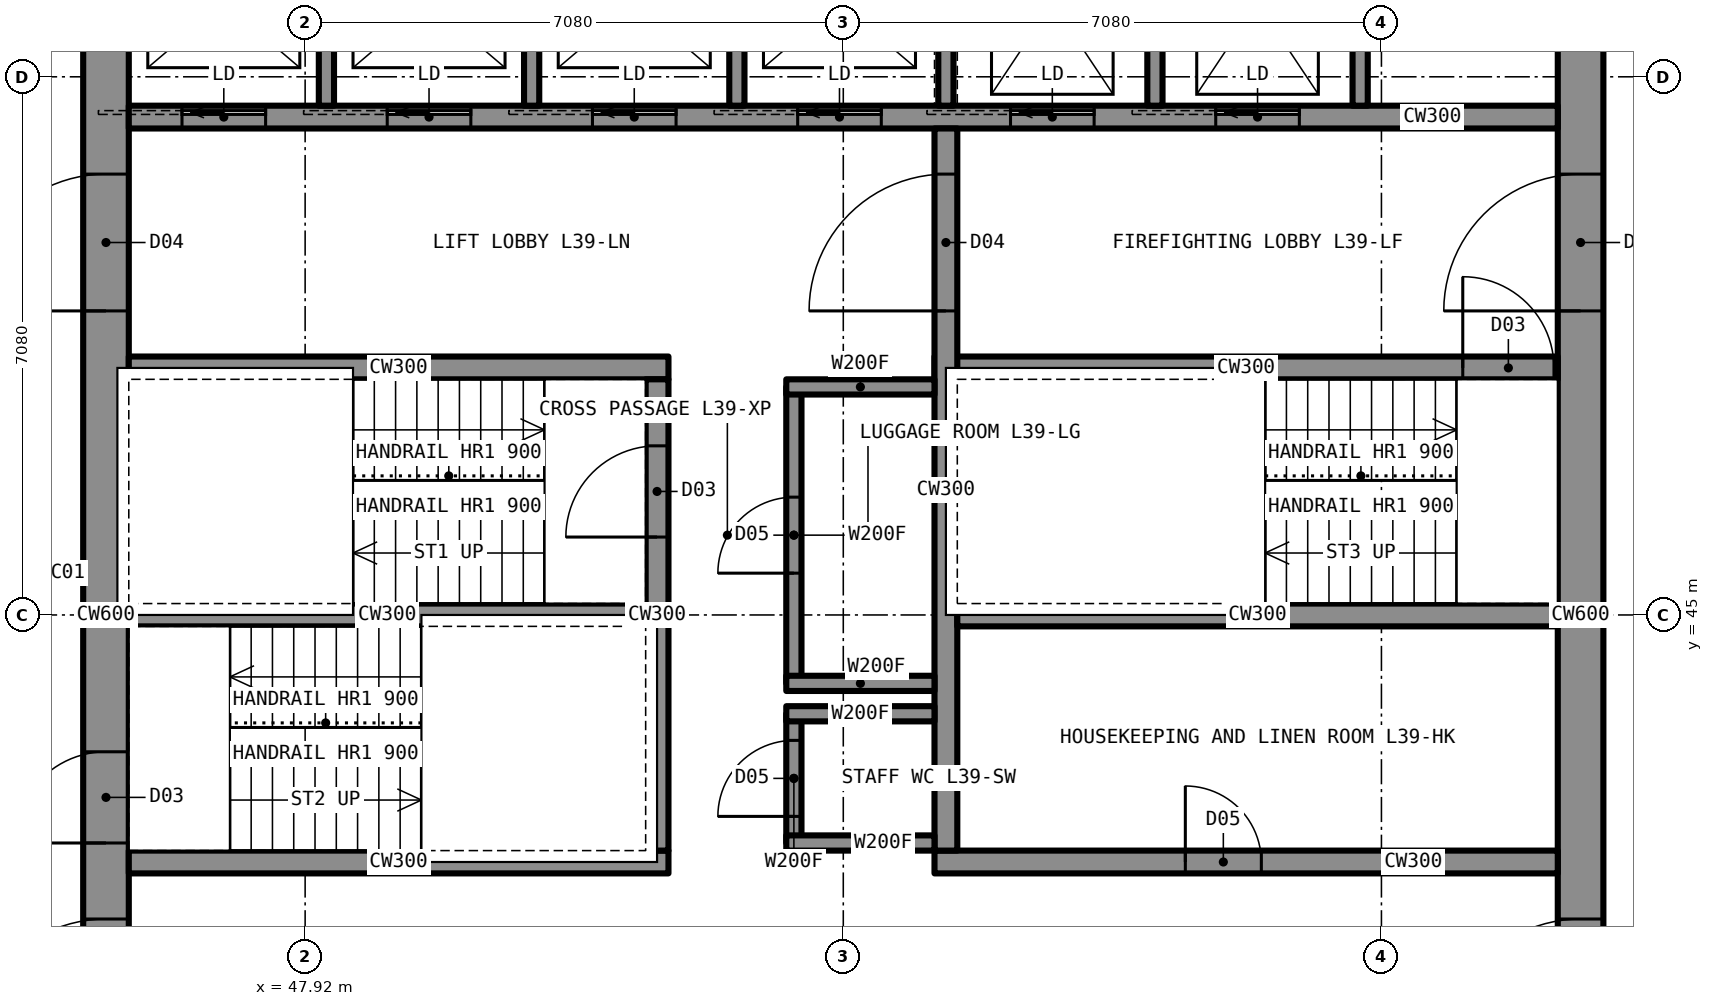
"""IFC4 building model, lengths in metres.
Left out: names, types, materials, properties, quantities, classifications, styles, units other than length and angle.
Written with IfcOpenShell. Run it as: python <this file> out.ifc"""

import sys

from ifc_helpers import new_model, si_unit, direction, frame, frame_2d, origin, place, context, subcontext, project, spatial, rectangle, extrude, element, fill, save


model = new_model("IFC4")
c1 = context("Model", 3, precision=1e-05, world=origin(), true_north=direction((0.0, 1.0)))
c2 = subcontext(c1, "Body", "Model", "MODEL_VIEW")
j1 = project(units=[si_unit("LENGTHUNIT", "METRE"), si_unit("PLANEANGLEUNIT", "RADIAN")], contexts=[c1])
p1 = place(None, origin())
s1 = spatial("IfcSite", under=j1, at=p1, CompositionType="ELEMENT")
p2 = place(p1, origin())
s2 = spatial("IfcBuilding", under=s1, at=p2, CompositionType="ELEMENT")
p3 = place(p2, frame((0.0, 0.0, 145.9)))
s3 = spatial("IfcBuildingStorey", under=s2, at=p3, CompositionType="ELEMENT", Elevation=145.9)
p4 = place(p3, frame((64.7, 35.6, 0.0), z_axis=(0.0, 0.0, 1.0), x_axis=(0.0, 1.0, 0.0)))
e1 = element("IfcWall", 1, at=p4, inside=s3, PredefinedType="SHEAR", context=c2, shape_type="SweptSolid", body=[
    extrude(rectangle(XDim=18.8, YDim=0.6, at=frame_2d((9.4, 0.0))), origin(), (0.0, 0.0, 1.0), 3.5),
])
p5 = place(p4, frame((13.4, 0.0, 0.0)))
e2 = element("IfcOpeningElement", 2, at=p5, cuts=e1, PredefinedType="OPENING", context=c2, shape_type="SweptSolid", body=[
    extrude(rectangle(XDim=1.8, YDim=2.2, at=frame_2d((0.9, 1.1))), frame((0.0, 0.31, 0.0), z_axis=(0.0, -1.0, 0.0), x_axis=(1.0, 0.0, 0.0)), (0.0, 0.0, 1.0), 0.62),
])
p6 = place(p4, frame((3.6, 0.0, 0.0)))
e3 = element("IfcOpeningElement", 3, at=p6, cuts=e1, PredefinedType="OPENING", context=c2, shape_type="SweptSolid", body=[
    extrude(rectangle(XDim=1.8, YDim=2.2, at=frame_2d((0.9, 1.1))), frame((0.0, 0.31, 0.0), z_axis=(0.0, -1.0, 0.0), x_axis=(1.0, 0.0, 0.0)), (0.0, 0.0, 1.0), 0.62),
])
p7 = place(p3, frame((45.3, 35.6, 0.0), z_axis=(0.0, 0.0, 1.0), x_axis=(0.0, 1.0, 0.0)))
e4 = element("IfcWall", 4, at=p7, inside=s3, PredefinedType="SHEAR", context=c2, shape_type="SweptSolid", body=[
    extrude(rectangle(XDim=18.8, YDim=0.6, at=frame_2d((9.4, 0.0))), origin(), (0.0, 0.0, 1.0), 3.5),
])
p8 = place(p7, frame((13.4, 0.0, 0.0)))
e5 = element("IfcOpeningElement", 5, at=p8, cuts=e4, PredefinedType="OPENING", context=c2, shape_type="SweptSolid", body=[
    extrude(rectangle(XDim=1.8, YDim=2.2, at=frame_2d((0.9, 1.1))), frame((0.0, 0.31, 0.0), z_axis=(0.0, -1.0, 0.0), x_axis=(1.0, 0.0, 0.0)), (0.0, 0.0, 1.0), 0.62),
])
p9 = place(p7, frame((3.6, 0.0, 0.0)))
e6 = element("IfcOpeningElement", 6, at=p9, cuts=e4, PredefinedType="OPENING", context=c2, shape_type="SweptSolid", body=[
    extrude(rectangle(XDim=1.8, YDim=2.2, at=frame_2d((0.9, 1.1))), frame((0.0, 0.31, 0.0), z_axis=(0.0, -1.0, 0.0), x_axis=(1.0, 0.0, 0.0)), (0.0, 0.0, 1.0), 0.62),
])
p10 = place(p7, frame((6.4, 0.0, 0.0)))
e7 = element("IfcOpeningElement", 7, at=p10, cuts=e4, PredefinedType="OPENING", context=c2, shape_type="SweptSolid", body=[
    extrude(rectangle(XDim=1.2, YDim=2.2, at=frame_2d((0.6, 1.1))), frame((0.0, 0.31, 0.0), z_axis=(0.0, -1.0, 0.0), x_axis=(1.0, 0.0, 0.0)), (0.0, 0.0, 1.0), 0.62),
])
p11 = place(p3, frame((45.6, 51.55, 0.0), z_axis=(0.0, 0.0, 1.0), x_axis=(1.0, 0.0, 0.0)))
e8 = element("IfcWall", 8, at=p11, inside=s3, PredefinedType="SHEAR", context=c2, shape_type="SweptSolid", body=[
    extrude(rectangle(XDim=18.8, YDim=0.3, at=frame_2d((9.4, 0.0))), origin(), (0.0, 0.0, 1.0), 3.5),
])
p12 = place(p11, frame((0.7, 0.0, 0.0)))
e9 = element("IfcOpeningElement", 9, at=p12, cuts=e8, PredefinedType="OPENING", context=c2, shape_type="SweptSolid", body=[
    extrude(rectangle(XDim=1.1, YDim=2.2, at=frame_2d((0.55, 1.1))), frame((0.0, 0.16, 0.0), z_axis=(0.0, -1.0, 0.0), x_axis=(1.0, 0.0, 0.0)), (0.0, 0.0, 1.0), 0.32),
])
p13 = place(p11, frame((3.4, 0.0, 0.0)))
e10 = element("IfcOpeningElement", 10, at=p13, cuts=e8, PredefinedType="OPENING", context=c2, shape_type="SweptSolid", body=[
    extrude(rectangle(XDim=1.1, YDim=2.2, at=frame_2d((0.55, 1.1))), frame((0.0, 0.16, 0.0), z_axis=(0.0, -1.0, 0.0), x_axis=(1.0, 0.0, 0.0)), (0.0, 0.0, 1.0), 0.32),
])
p14 = place(p11, frame((6.1, 0.0, 0.0)))
e11 = element("IfcOpeningElement", 11, at=p14, cuts=e8, PredefinedType="OPENING", context=c2, shape_type="SweptSolid", body=[
    extrude(rectangle(XDim=1.1, YDim=2.2, at=frame_2d((0.55, 1.1))), frame((0.0, 0.16, 0.0), z_axis=(0.0, -1.0, 0.0), x_axis=(1.0, 0.0, 0.0)), (0.0, 0.0, 1.0), 0.32),
])
p15 = place(p11, frame((8.8, 0.0, 0.0)))
e12 = element("IfcOpeningElement", 12, at=p15, cuts=e8, PredefinedType="OPENING", context=c2, shape_type="SweptSolid", body=[
    extrude(rectangle(XDim=1.1, YDim=2.2, at=frame_2d((0.55, 1.1))), frame((0.0, 0.16, 0.0), z_axis=(0.0, -1.0, 0.0), x_axis=(1.0, 0.0, 0.0)), (0.0, 0.0, 1.0), 0.32),
])
p16 = place(p11, frame((11.6, 0.0, 0.0)))
e13 = element("IfcOpeningElement", 13, at=p16, cuts=e8, PredefinedType="OPENING", context=c2, shape_type="SweptSolid", body=[
    extrude(rectangle(XDim=1.1, YDim=2.2, at=frame_2d((0.55, 1.1))), frame((0.0, 0.16, 0.0), z_axis=(0.0, -1.0, 0.0), x_axis=(1.0, 0.0, 0.0)), (0.0, 0.0, 1.0), 0.32),
])
p17 = place(p11, frame((14.3, 0.0, 0.0)))
e14 = element("IfcOpeningElement", 14, at=p17, cuts=e8, PredefinedType="OPENING", context=c2, shape_type="SweptSolid", body=[
    extrude(rectangle(XDim=1.1, YDim=2.2, at=frame_2d((0.55, 1.1))), frame((0.0, 0.16, 0.0), z_axis=(0.0, -1.0, 0.0), x_axis=(1.0, 0.0, 0.0)), (0.0, 0.0, 1.0), 0.32),
])
p18 = place(p3, frame((45.6, 48.25, 0.0), z_axis=(0.0, 0.0, 1.0), x_axis=(1.0, 0.0, 0.0)))
e15 = element("IfcWall", 15, at=p18, inside=s3, PredefinedType="SHEAR", context=c2, shape_type="SweptSolid", body=[
    extrude(rectangle(XDim=7.1, YDim=0.3, at=frame_2d((3.55, 0.0))), origin(), (0.0, 0.0, 1.0), 3.5),
])
p19 = place(p3, frame((56.2, 48.25, 0.0), z_axis=(0.0, 0.0, 1.0), x_axis=(1.0, 0.0, 0.0)))
e16 = element("IfcWall", 16, at=p19, inside=s3, PredefinedType="SHEAR", context=c2, shape_type="SweptSolid", body=[
    extrude(rectangle(XDim=8.2, YDim=0.3, at=frame_2d((4.1, 0.0))), origin(), (0.0, 0.0, 1.0), 3.5),
])
p20 = place(p19, frame((6.95, 0.0, 0.0)))
e17 = element("IfcOpeningElement", 17, at=p20, cuts=e16, PredefinedType="OPENING", context=c2, shape_type="SweptSolid", body=[
    extrude(rectangle(XDim=1.2, YDim=2.2, at=frame_2d((0.6, 1.1))), frame((0.0, 0.16, 0.0), z_axis=(0.0, -1.0, 0.0), x_axis=(1.0, 0.0, 0.0)), (0.0, 0.0, 1.0), 0.32),
])
p21 = place(p3, frame((45.6, 41.75, 0.0), z_axis=(0.0, 0.0, 1.0), x_axis=(1.0, 0.0, 0.0)))
e18 = element("IfcWall", 18, at=p21, inside=s3, PredefinedType="SHEAR", context=c2, shape_type="SweptSolid", body=[
    extrude(rectangle(XDim=7.1, YDim=0.3, at=frame_2d((3.55, 0.0))), origin(), (0.0, 0.0, 1.0), 3.5),
])
p22 = place(p3, frame((56.2, 41.75, 0.0), z_axis=(0.0, 0.0, 1.0), x_axis=(1.0, 0.0, 0.0)))
e19 = element("IfcWall", 19, at=p22, inside=s3, PredefinedType="SHEAR", context=c2, shape_type="SweptSolid", body=[
    extrude(rectangle(XDim=8.2, YDim=0.3, at=frame_2d((4.1, 0.0))), origin(), (0.0, 0.0, 1.0), 3.5),
])
p23 = place(p22, frame((3.3, 0.0, 0.0)))
e20 = element("IfcOpeningElement", 20, at=p23, cuts=e19, PredefinedType="OPENING", context=c2, shape_type="SweptSolid", body=[
    extrude(rectangle(XDim=1.0, YDim=2.1, at=frame_2d((0.5, 1.05))), frame((0.0, 0.16, 0.0), z_axis=(0.0, -1.0, 0.0), x_axis=(1.0, 0.0, 0.0)), (0.0, 0.0, 1.0), 0.32),
])
p24 = place(p3, frame((52.55, 41.9, 0.0), z_axis=(0.0, 0.0, 1.0), x_axis=(0.0, 1.0, 0.0)))
e21 = element("IfcWall", 21, at=p24, inside=s3, PredefinedType="SHEAR", context=c2, shape_type="SweptSolid", body=[
    extrude(rectangle(XDim=6.2, YDim=0.3, at=frame_2d((3.1, 0.0))), origin(), (0.0, 0.0, 1.0), 3.5),
])
p25 = place(p24, frame((4.125, 0.0, 0.0)))
e22 = element("IfcOpeningElement", 22, at=p25, cuts=e21, PredefinedType="OPENING", context=c2, shape_type="SweptSolid", body=[
    extrude(rectangle(XDim=1.2, YDim=2.2, at=frame_2d((0.6, 1.1))), frame((0.0, 0.16, 0.0), z_axis=(0.0, -1.0, 0.0), x_axis=(1.0, 0.0, 0.0)), (0.0, 0.0, 1.0), 0.32),
])
p26 = place(p3, frame((56.35, 41.9, 0.0), z_axis=(0.0, 0.0, 1.0), x_axis=(0.0, 1.0, 0.0)))
e23 = element("IfcWall", 23, at=p26, inside=s3, PredefinedType="SHEAR", context=c2, shape_type="SweptSolid", body=[
    extrude(rectangle(XDim=9.5, YDim=0.3, at=frame_2d((4.75, 0.0))), origin(), (0.0, 0.0, 1.0), 3.5),
])
p27 = place(p26, frame((7.1, 0.0, 0.0)))
e24 = element("IfcOpeningElement", 24, at=p27, cuts=e23, PredefinedType="OPENING", context=c2, shape_type="SweptSolid", body=[
    extrude(rectangle(XDim=1.8, YDim=2.2, at=frame_2d((0.9, 1.1))), frame((0.0, 0.16, 0.0), z_axis=(0.0, -1.0, 0.0), x_axis=(1.0, 0.0, 0.0)), (0.0, 0.0, 1.0), 0.32),
])
p28 = place(p3, frame((45.6, 45.0, 0.0), z_axis=(0.0, 0.0, 1.0), x_axis=(1.0, 0.0, 0.0)))
e25 = element("IfcWall", 25, at=p28, inside=s3, PredefinedType="SHEAR", context=c2, shape_type="SweptSolid", body=[
    extrude(rectangle(XDim=6.8, YDim=0.3, at=frame_2d((3.4, 0.0))), origin(), (0.0, 0.0, 1.0), 3.5),
])
p29 = place(p3, frame((56.5, 45.0, 0.0), z_axis=(0.0, 0.0, 1.0), x_axis=(1.0, 0.0, 0.0)))
e26 = element("IfcWall", 26, at=p29, inside=s3, PredefinedType="SHEAR", context=c2, shape_type="SweptSolid", body=[
    extrude(rectangle(XDim=7.9, YDim=0.3, at=frame_2d((3.95, 0.0))), origin(), (0.0, 0.0, 1.0), 3.5),
])
p30 = place(p3, frame((54.35, 42.0, 0.0), z_axis=(0.0, 0.0, 1.0), x_axis=(0.0, 1.0, 0.0)))
e27 = element("IfcWall", 27, at=p30, inside=s3, PredefinedType="PARTITIONING", context=c2, shape_type="SweptSolid", body=[
    extrude(rectangle(XDim=1.7, YDim=0.2, at=frame_2d((0.85, 0.0))), origin(), (0.0, 0.0, 1.0), 3.33),
])
p31 = place(p30, frame((0.35, 0.0, 0.0)))
e28 = element("IfcOpeningElement", 28, at=p31, cuts=e27, PredefinedType="OPENING", context=c2, shape_type="SweptSolid", body=[
    extrude(rectangle(XDim=1.0, YDim=2.1, at=frame_2d((0.5, 1.05))), frame((0.0, 0.11, 0.0), z_axis=(0.0, -1.0, 0.0), x_axis=(1.0, 0.0, 0.0)), (0.0, 0.0, 1.0), 0.22),
])
for number, where, z_axis, x_axis in (
    (29, (54.25, 42.0, 0.0), (0.0, 0.0, 1.0), (1.0, 0.0, 0.0)),
    (30, (54.25, 43.7, 0.0), (0.0, 0.0, 1.0), (1.0, 0.0, 0.0)),
):
    element("IfcWall", number, at=place(p3, frame(where, z_axis=z_axis, x_axis=x_axis)), inside=s3, PredefinedType="PARTITIONING", context=c2, shape_type="SweptSolid", body=[
        extrude(rectangle(XDim=1.95, YDim=0.2, at=frame_2d((0.975, 0.0))), origin(), (0.0, 0.0, 1.0), 3.33),
    ])
p32 = place(p3, frame((54.35, 44.1, 0.0), z_axis=(0.0, 0.0, 1.0), x_axis=(0.0, 1.0, 0.0)))
e31 = element("IfcWall", 31, at=p32, inside=s3, PredefinedType="PARTITIONING", context=c2, shape_type="SweptSolid", body=[
    extrude(rectangle(XDim=3.9, YDim=0.2, at=frame_2d((1.95, 0.0))), origin(), (0.0, 0.0, 1.0), 3.33),
])
p33 = place(p32, frame((1.45, 0.0, 0.0)))
e32 = element("IfcOpeningElement", 32, at=p33, cuts=e31, PredefinedType="OPENING", context=c2, shape_type="SweptSolid", body=[
    extrude(rectangle(XDim=1.0, YDim=2.1, at=frame_2d((0.5, 1.05))), frame((0.0, 0.11, 0.0), z_axis=(0.0, -1.0, 0.0), x_axis=(1.0, 0.0, 0.0)), (0.0, 0.0, 1.0), 0.22),
])
for number, where, z_axis, x_axis in (
    (33, (54.25, 44.1, 0.0), (0.0, 0.0, 1.0), (1.0, 0.0, 0.0)),
    (34, (54.25, 48.0, 0.0), (0.0, 0.0, 1.0), (1.0, 0.0, 0.0)),
):
    element("IfcWall", number, at=place(p3, frame(where, z_axis=z_axis, x_axis=x_axis)), inside=s3, PredefinedType="PARTITIONING", context=c2, shape_type="SweptSolid", body=[
        extrude(rectangle(XDim=1.95, YDim=0.2, at=frame_2d((0.975, 0.0))), origin(), (0.0, 0.0, 1.0), 3.33),
    ])
for number, where, z_axis, x_axis in (
    (35, (48.2, 51.7, 0.0), (0.0, 0.0, 1.0), (0.0, 1.0, 0.0)),
    (36, (50.9, 51.7, 0.0), (0.0, 0.0, 1.0), (0.0, 1.0, 0.0)),
    (37, (53.6, 51.7, 0.0), (0.0, 0.0, 1.0), (0.0, 1.0, 0.0)),
    (38, (59.1, 51.7, 0.0), (0.0, 0.0, 1.0), (0.0, 1.0, 0.0)),
    (39, (61.8, 51.7, 0.0), (0.0, 0.0, 1.0), (0.0, 1.0, 0.0)),
    (40, (56.35, 51.7, 0.0), (0.0, 0.0, 1.0), (0.0, 1.0, 0.0)),
):
    element("IfcWall", number, at=place(p3, frame(where, z_axis=z_axis, x_axis=x_axis)), inside=s3, PredefinedType="PARTITIONING", context=c2, shape_type="SweptSolid", body=[
        extrude(rectangle(XDim=2.7, YDim=0.2, at=frame_2d((1.35, 0.0))), origin(), (0.0, 0.0, 1.0), 3.33),
    ])
p34 = place(p31, origin())
e41 = element("IfcDoor", 41, at=p34, inside=s3, OperationType="SINGLE_SWING_LEFT", PredefinedType="DOOR", context=c2, shape_type="SweptSolid", body=[
    extrude(rectangle(XDim=1.0, YDim=2.1, at=frame_2d((0.5, 1.05))), frame((0.0, 0.025, 0.0), z_axis=(0.0, -1.0, 0.0), x_axis=(1.0, 0.0, 0.0)), (0.0, 0.0, 1.0), 0.05),
])
fill(e28, e41)
p35 = place(p33, origin())
e42 = element("IfcDoor", 42, at=p35, inside=s3, OperationType="SINGLE_SWING_LEFT", PredefinedType="DOOR", context=c2, shape_type="SweptSolid", body=[
    extrude(rectangle(XDim=1.0, YDim=2.1, at=frame_2d((0.5, 1.05))), frame((0.0, 0.025, 0.0), z_axis=(0.0, -1.0, 0.0), x_axis=(1.0, 0.0, 0.0)), (0.0, 0.0, 1.0), 0.05),
])
fill(e32, e42)
p36 = place(p8, origin())
e43 = element("IfcDoor", 43, at=p36, inside=s3, OperationType="DOUBLE_DOOR_SINGLE_SWING", PredefinedType="DOOR", context=c2, shape_type="SweptSolid", body=[
    extrude(rectangle(XDim=1.8, YDim=2.2, at=frame_2d((0.9, 1.1))), frame((0.0, 0.025, 0.0), z_axis=(0.0, -1.0, 0.0), x_axis=(1.0, 0.0, 0.0)), (0.0, 0.0, 1.0), 0.05),
])
fill(e5, e43)
p37 = place(p9, origin())
e44 = element("IfcDoor", 44, at=p37, inside=s3, OperationType="DOUBLE_DOOR_SINGLE_SWING", PredefinedType="DOOR", context=c2, shape_type="SweptSolid", body=[
    extrude(rectangle(XDim=1.8, YDim=2.2, at=frame_2d((0.9, 1.1))), frame((0.0, 0.025, 0.0), z_axis=(0.0, -1.0, 0.0), x_axis=(1.0, 0.0, 0.0)), (0.0, 0.0, 1.0), 0.05),
])
fill(e6, e44)
p38 = place(p5, origin())
e45 = element("IfcDoor", 45, at=p38, inside=s3, OperationType="DOUBLE_DOOR_SINGLE_SWING", PredefinedType="DOOR", context=c2, shape_type="SweptSolid", body=[
    extrude(rectangle(XDim=1.8, YDim=2.2, at=frame_2d((0.9, 1.1))), frame((0.0, 0.025, 0.0), z_axis=(0.0, -1.0, 0.0), x_axis=(1.0, 0.0, 0.0)), (0.0, 0.0, 1.0), 0.05),
])
fill(e2, e45)
p39 = place(p6, origin())
e46 = element("IfcDoor", 46, at=p39, inside=s3, OperationType="DOUBLE_DOOR_SINGLE_SWING", PredefinedType="DOOR", context=c2, shape_type="SweptSolid", body=[
    extrude(rectangle(XDim=1.8, YDim=2.2, at=frame_2d((0.9, 1.1))), frame((0.0, 0.025, 0.0), z_axis=(0.0, -1.0, 0.0), x_axis=(1.0, 0.0, 0.0)), (0.0, 0.0, 1.0), 0.05),
])
fill(e3, e46)
p40 = place(p27, origin())
e47 = element("IfcDoor", 47, at=p40, inside=s3, OperationType="DOUBLE_DOOR_SINGLE_SWING", PredefinedType="DOOR", context=c2, shape_type="SweptSolid", body=[
    extrude(rectangle(XDim=1.8, YDim=2.2, at=frame_2d((0.9, 1.1))), frame((0.0, 0.025, 0.0), z_axis=(0.0, -1.0, 0.0), x_axis=(1.0, 0.0, 0.0)), (0.0, 0.0, 1.0), 0.05),
])
fill(e24, e47)
p41 = place(p25, origin())
e48 = element("IfcDoor", 48, at=p41, inside=s3, OperationType="SINGLE_SWING_LEFT", PredefinedType="DOOR", context=c2, shape_type="SweptSolid", body=[
    extrude(rectangle(XDim=1.2, YDim=2.2, at=frame_2d((0.6, 1.1))), frame((0.0, 0.025, 0.0), z_axis=(0.0, -1.0, 0.0), x_axis=(1.0, 0.0, 0.0)), (0.0, 0.0, 1.0), 0.05),
])
fill(e22, e48)
p42 = place(p10, origin())
e49 = element("IfcDoor", 49, at=p42, inside=s3, OperationType="SINGLE_SWING_LEFT", PredefinedType="DOOR", context=c2, shape_type="SweptSolid", body=[
    extrude(rectangle(XDim=1.2, YDim=2.2, at=frame_2d((0.6, 1.1))), frame((0.0, 0.025, 0.0), z_axis=(0.0, -1.0, 0.0), x_axis=(1.0, 0.0, 0.0)), (0.0, 0.0, 1.0), 0.05),
])
fill(e7, e49)
p43 = place(p20, origin())
e50 = element("IfcDoor", 50, at=p43, inside=s3, OperationType="SINGLE_SWING_LEFT", PredefinedType="DOOR", context=c2, shape_type="SweptSolid", body=[
    extrude(rectangle(XDim=1.2, YDim=2.2, at=frame_2d((0.6, 1.1))), frame((0.0, 0.025, 0.0), z_axis=(0.0, -1.0, 0.0), x_axis=(1.0, 0.0, 0.0)), (0.0, 0.0, 1.0), 0.05),
])
fill(e17, e50)
p44 = place(p23, origin())
e51 = element("IfcDoor", 51, at=p44, inside=s3, OperationType="SINGLE_SWING_LEFT", PredefinedType="DOOR", context=c2, shape_type="SweptSolid", body=[
    extrude(rectangle(XDim=1.0, YDim=2.1, at=frame_2d((0.5, 1.05))), frame((0.0, 0.025, 0.0), z_axis=(0.0, -1.0, 0.0), x_axis=(1.0, 0.0, 0.0)), (0.0, 0.0, 1.0), 0.05),
])
fill(e20, e51)
p45 = place(p12, origin())
e52 = element("IfcDoor", 52, at=p45, inside=s3, OperationType="SLIDING_TO_LEFT", PredefinedType="DOOR", context=c2, shape_type="SweptSolid", body=[
    extrude(rectangle(XDim=1.1, YDim=2.2, at=frame_2d((0.55, 1.1))), frame((0.0, 0.025, 0.0), z_axis=(0.0, -1.0, 0.0), x_axis=(1.0, 0.0, 0.0)), (0.0, 0.0, 1.0), 0.05),
])
fill(e9, e52)
p46 = place(p13, origin())
e53 = element("IfcDoor", 53, at=p46, inside=s3, OperationType="SLIDING_TO_LEFT", PredefinedType="DOOR", context=c2, shape_type="SweptSolid", body=[
    extrude(rectangle(XDim=1.1, YDim=2.2, at=frame_2d((0.55, 1.1))), frame((0.0, 0.025, 0.0), z_axis=(0.0, -1.0, 0.0), x_axis=(1.0, 0.0, 0.0)), (0.0, 0.0, 1.0), 0.05),
])
fill(e10, e53)
p47 = place(p14, origin())
e54 = element("IfcDoor", 54, at=p47, inside=s3, OperationType="SLIDING_TO_LEFT", PredefinedType="DOOR", context=c2, shape_type="SweptSolid", body=[
    extrude(rectangle(XDim=1.1, YDim=2.2, at=frame_2d((0.55, 1.1))), frame((0.0, 0.025, 0.0), z_axis=(0.0, -1.0, 0.0), x_axis=(1.0, 0.0, 0.0)), (0.0, 0.0, 1.0), 0.05),
])
fill(e11, e54)
p48 = place(p15, origin())
e55 = element("IfcDoor", 55, at=p48, inside=s3, OperationType="SLIDING_TO_LEFT", PredefinedType="DOOR", context=c2, shape_type="SweptSolid", body=[
    extrude(rectangle(XDim=1.1, YDim=2.2, at=frame_2d((0.55, 1.1))), frame((0.0, 0.025, 0.0), z_axis=(0.0, -1.0, 0.0), x_axis=(1.0, 0.0, 0.0)), (0.0, 0.0, 1.0), 0.05),
])
fill(e12, e55)
p49 = place(p16, origin())
e56 = element("IfcDoor", 56, at=p49, inside=s3, OperationType="SLIDING_TO_LEFT", PredefinedType="DOOR", context=c2, shape_type="SweptSolid", body=[
    extrude(rectangle(XDim=1.1, YDim=2.2, at=frame_2d((0.55, 1.1))), frame((0.0, 0.025, 0.0), z_axis=(0.0, -1.0, 0.0), x_axis=(1.0, 0.0, 0.0)), (0.0, 0.0, 1.0), 0.05),
])
fill(e13, e56)
p50 = place(p17, origin())
e57 = element("IfcDoor", 57, at=p50, inside=s3, OperationType="SLIDING_TO_LEFT", PredefinedType="DOOR", context=c2, shape_type="SweptSolid", body=[
    extrude(rectangle(XDim=1.1, YDim=2.2, at=frame_2d((0.55, 1.1))), frame((0.0, 0.025, 0.0), z_axis=(0.0, -1.0, 0.0), x_axis=(1.0, 0.0, 0.0)), (0.0, 0.0, 1.0), 0.05),
])
fill(e14, e57)
save(model, sys.argv[1])
